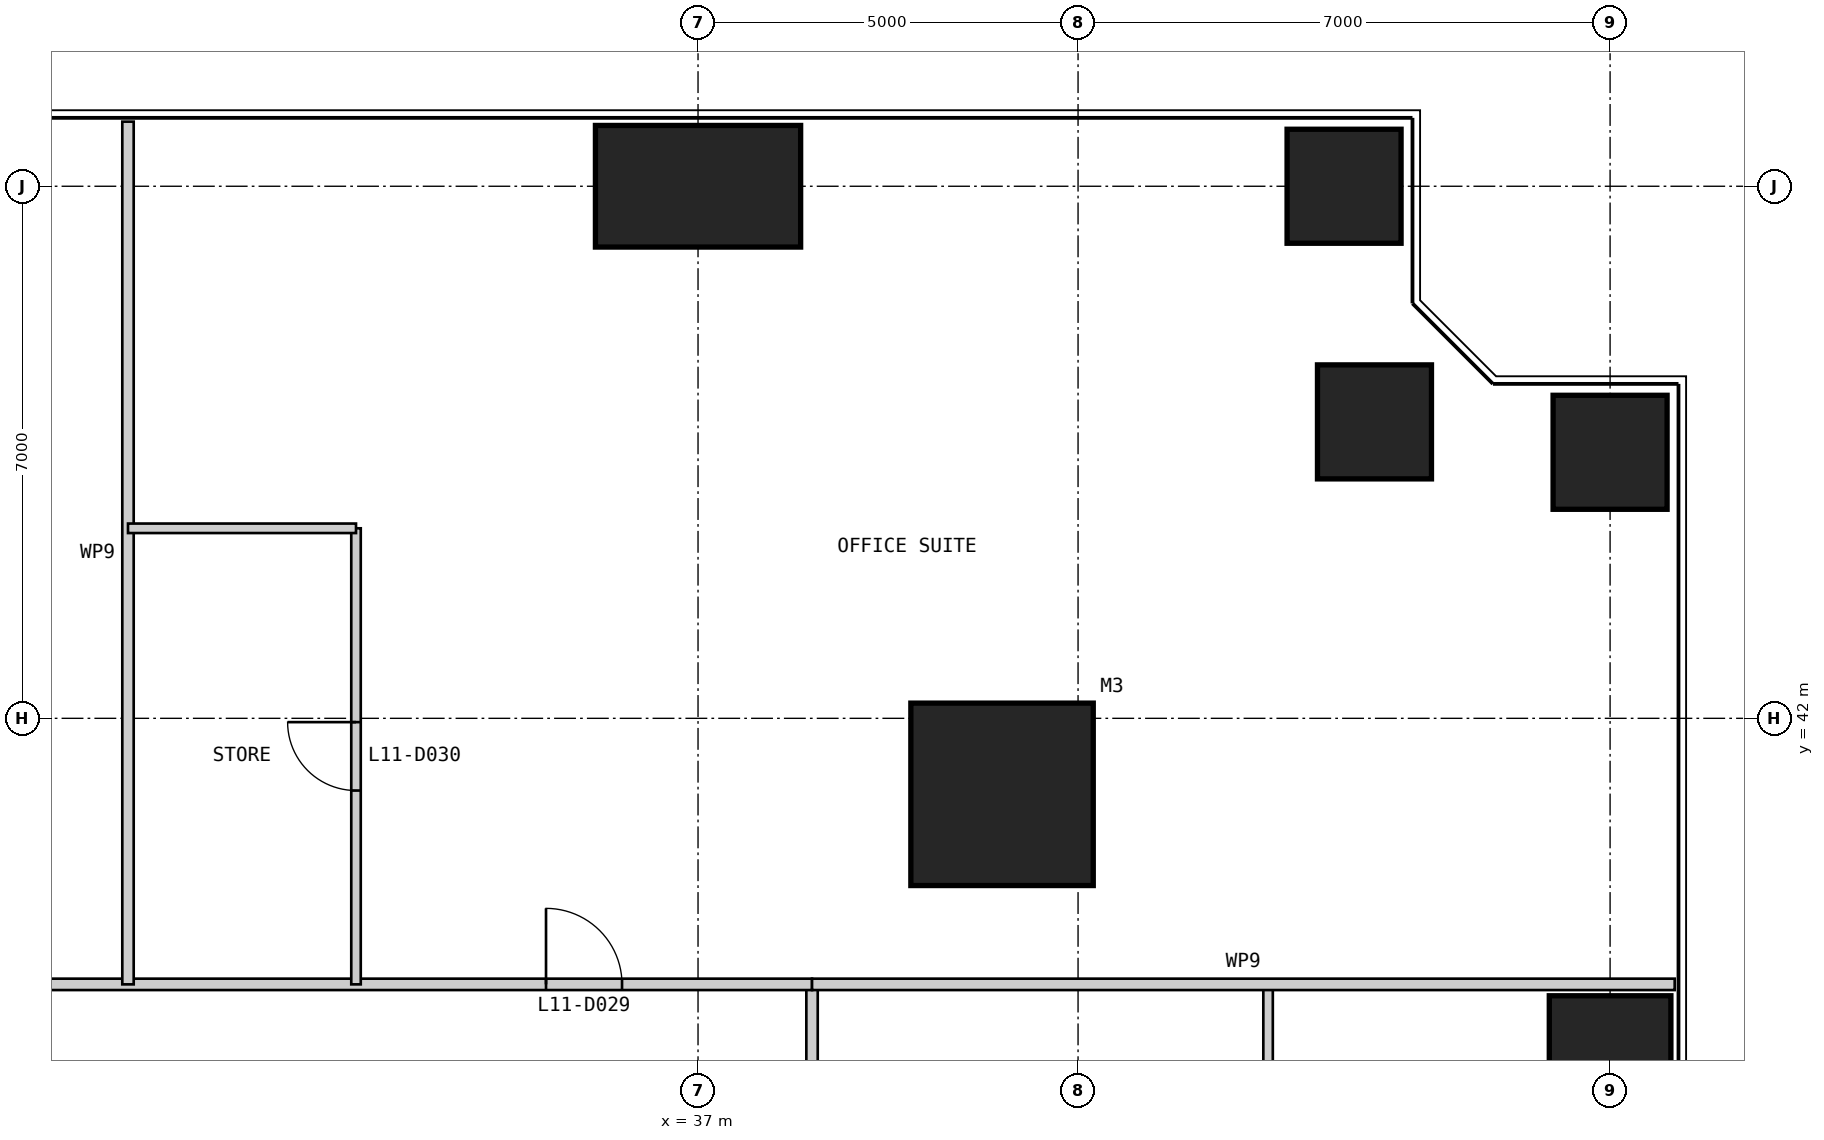
"""IFC4 building model, lengths in metres.
Left out: names, types, materials, properties, quantities, classifications, styles, units other than length and angle.
Written with IfcOpenShell. Run it as: python <this file> out.ifc"""

import sys

from ifc_helpers import new_model, si_unit, direction, frame, frame_2d, origin, origin_2d, place, context, subcontext, project, spatial, rectangle, extrude, element, fill, save


model = new_model("IFC4")
c1 = context("Model", 3, precision=1e-05, world=origin(), true_north=direction((0.0, 1.0)))
c2 = subcontext(c1, "Body", "Model", "MODEL_VIEW")
j1 = project(units=[si_unit("LENGTHUNIT", "METRE"), si_unit("PLANEANGLEUNIT", "RADIAN")], contexts=[c1])
p1 = place(None, origin())
s1 = spatial("IfcSite", under=j1, at=p1, CompositionType="ELEMENT")
p2 = place(p1, origin())
s2 = spatial("IfcBuilding", under=s1, at=p2, CompositionType="ELEMENT")
p3 = place(p2, frame((0.0, 0.0, 51.0)))
s3 = spatial("IfcBuildingStorey", under=s2, at=p3, CompositionType="ELEMENT", Elevation=51.0)
p4 = place(p3, frame((41.0, 41.0, 0.0), z_axis=(0.0, 0.0, 1.0), x_axis=(1.0, 0.0, 0.0)))
e1 = element("IfcColumn", 1, at=p4, inside=s3, PredefinedType="COLUMN", context=c2, shape_type="SweptSolid", body=[
    extrude(rectangle(XDim=2.4, YDim=2.4, at=origin_2d()), origin(), (0.0, 0.0, 1.0), 4.0),
])
p5 = place(p3, frame((49.0, 37.0, 0.0), z_axis=(0.0, 0.0, 1.0), x_axis=(1.0, 0.0, 0.0)))
e2 = element("IfcColumn", 2, at=p5, inside=s3, PredefinedType="COLUMN", context=c2, shape_type="SweptSolid", body=[
    extrude(rectangle(XDim=1.6, YDim=2.7, at=origin_2d()), origin(), (0.0, 0.0, 1.0), 4.0),
])
for number, where, z_axis, x_axis in (
    (3, (49.0, 45.5, 0.0), (0.0, 0.0, 1.0), (1.0, 0.0, 0.0)),
    (4, (45.9, 45.9, 0.0), (0.0, 0.0, 1.0), (1.0, 0.0, 0.0)),
    (5, (45.5, 49.0, 0.0), (0.0, 0.0, 1.0), (1.0, 0.0, 0.0)),
):
    element("IfcColumn", number, at=place(p3, frame(where, z_axis=z_axis, x_axis=x_axis)), inside=s3, PredefinedType="COLUMN", context=c2, shape_type="SweptSolid", body=[
        extrude(rectangle(XDim=1.5, YDim=1.5, at=origin_2d()), origin(), (0.0, 0.0, 1.0), 4.0),
    ])
p6 = place(p3, frame((37.0, 49.0, 0.0), z_axis=(0.0, 0.0, 1.0), x_axis=(1.0, 0.0, 0.0)))
e6 = element("IfcColumn", 6, at=p6, inside=s3, PredefinedType="COLUMN", context=c2, shape_type="SweptSolid", body=[
    extrude(rectangle(XDim=2.7, YDim=1.6, at=origin_2d()), origin(), (0.0, 0.0, 1.0), 4.0),
])
p7 = place(p3, frame((38.5, 11.5, 0.0), z_axis=(0.0, 0.0, 1.0), x_axis=(0.0, 1.0, 0.0)))
e7 = element("IfcWall", 7, at=p7, inside=s3, PredefinedType="PARTITIONING", context=c2, shape_type="SweptSolid", body=[
    extrude(rectangle(XDim=27.0, YDim=0.15, at=frame_2d((13.5, 0.0))), origin(), (0.0, 0.0, 1.0), 3.85),
])
p8 = place(p7, frame((2.5, 0.0, 0.0)))
e8 = element("IfcOpeningElement", 8, at=p8, cuts=e7, PredefinedType="OPENING", context=c2, shape_type="SweptSolid", body=[
    extrude(rectangle(XDim=1.0, YDim=2.2, at=frame_2d((0.5, 1.1))), frame((0.0, 0.085, 0.0), z_axis=(0.0, -1.0, 0.0), x_axis=(1.0, 0.0, 0.0)), (0.0, 0.0, 1.0), 0.17),
])
p9 = place(p7, frame((16.0, 0.0, 0.0)))
e9 = element("IfcOpeningElement", 9, at=p9, cuts=e7, PredefinedType="OPENING", context=c2, shape_type="SweptSolid", body=[
    extrude(rectangle(XDim=1.0, YDim=2.2, at=frame_2d((0.5, 1.1))), frame((0.0, 0.085, 0.0), z_axis=(0.0, -1.0, 0.0), x_axis=(1.0, 0.0, 0.0)), (0.0, 0.0, 1.0), 0.17),
])
p10 = place(p3, frame((44.5, 32.5, 0.0), z_axis=(0.0, 0.0, 1.0), x_axis=(0.0, 1.0, 0.0)))
e10 = element("IfcWall", 10, at=p10, inside=s3, PredefinedType="PARTITIONING", context=c2, shape_type="SweptSolid", body=[
    extrude(rectangle(XDim=6.0, YDim=0.125, at=frame_2d((3.0, 0.0))), origin(), (0.0, 0.0, 1.0), 3.85),
])
p11 = place(p3, frame((38.5, 38.5, 0.0), z_axis=(0.0, 0.0, 1.0), x_axis=(-1.0, 0.0, 0.0)))
e11 = element("IfcWall", 11, at=p11, inside=s3, PredefinedType="PARTITIONING", context=c2, shape_type="SweptSolid", body=[
    extrude(rectangle(XDim=27.0, YDim=0.15, at=frame_2d((13.5, 0.0))), origin(), (0.0, 0.0, 1.0), 3.85),
])
p12 = place(p11, frame((2.5, 0.0, 0.0)))
e12 = element("IfcOpeningElement", 12, at=p12, cuts=e11, PredefinedType="OPENING", context=c2, shape_type="SweptSolid", body=[
    extrude(rectangle(XDim=1.0, YDim=2.2, at=frame_2d((0.5, 1.1))), frame((0.0, 0.085, 0.0), z_axis=(0.0, -1.0, 0.0), x_axis=(1.0, 0.0, 0.0)), (0.0, 0.0, 1.0), 0.17),
])
p13 = place(p11, frame((16.0, 0.0, 0.0)))
e13 = element("IfcOpeningElement", 13, at=p13, cuts=e11, PredefinedType="OPENING", context=c2, shape_type="SweptSolid", body=[
    extrude(rectangle(XDim=1.0, YDim=2.2, at=frame_2d((0.5, 1.1))), frame((0.0, 0.085, 0.0), z_axis=(0.0, -1.0, 0.0), x_axis=(1.0, 0.0, 0.0)), (0.0, 0.0, 1.0), 0.17),
])
p14 = place(p3, frame((49.85, 38.5, 0.0), z_axis=(0.0, 0.0, 1.0), x_axis=(-1.0, 0.0, 0.0)))
e14 = element("IfcWall", 14, at=p14, inside=s3, PredefinedType="PARTITIONING", context=c2, shape_type="SweptSolid", body=[
    extrude(rectangle(XDim=11.35, YDim=0.15, at=frame_2d((5.675, 0.0))), origin(), (0.0, 0.0, 1.0), 3.85),
])
p15 = place(p3, frame((32.5, 44.5, 0.0), z_axis=(0.0, 0.0, 1.0), x_axis=(0.0, -1.0, 0.0)))
e15 = element("IfcWall", 15, at=p15, inside=s3, PredefinedType="PARTITIONING", context=c2, shape_type="SweptSolid", body=[
    extrude(rectangle(XDim=6.0, YDim=0.125, at=frame_2d((3.0, 0.0))), origin(), (0.0, 0.0, 1.0), 3.85),
])
p16 = place(p15, frame((2.55, 0.0, 0.0)))
e16 = element("IfcOpeningElement", 16, at=p16, cuts=e15, PredefinedType="OPENING", context=c2, shape_type="SweptSolid", body=[
    extrude(rectangle(XDim=0.9, YDim=2.2, at=frame_2d((0.45, 1.1))), frame((0.0, 0.073, 0.0), z_axis=(0.0, -1.0, 0.0), x_axis=(1.0, 0.0, 0.0)), (0.0, 0.0, 1.0), 0.145),
])
p17 = place(p3, frame((29.5, 49.85, 0.0), z_axis=(0.0, 0.0, 1.0), x_axis=(0.0, -1.0, 0.0)))
e17 = element("IfcWall", 17, at=p17, inside=s3, PredefinedType="PARTITIONING", context=c2, shape_type="SweptSolid", body=[
    extrude(rectangle(XDim=11.35, YDim=0.15, at=frame_2d((5.675, 0.0))), origin(), (0.0, 0.0, 1.0), 3.85),
])
p18 = place(p3, frame((32.5, 44.5, 0.0), z_axis=(0.0, 0.0, 1.0), x_axis=(-1.0, 0.0, 0.0)))
e18 = element("IfcWall", 18, at=p18, inside=s3, PredefinedType="PARTITIONING", context=c2, shape_type="SweptSolid", body=[
    extrude(rectangle(XDim=3.0, YDim=0.125, at=frame_2d((1.5, 0.0))), origin(), (0.0, 0.0, 1.0), 3.85),
])
p19 = place(p12, frame((1.0, 0.0, 0.0), z_axis=(0.0, 0.0, 1.0), x_axis=(-1.0, 0.0, 0.0)))
e19 = element("IfcDoor", 19, at=p19, inside=s3, OperationType="SINGLE_SWING_LEFT", PredefinedType="DOOR", context=c2, shape_type="SweptSolid", body=[
    extrude(rectangle(XDim=1.0, YDim=2.2, at=frame_2d((0.5, 1.1))), frame((0.0, 0.025, 0.0), z_axis=(0.0, -1.0, 0.0), x_axis=(1.0, 0.0, 0.0)), (0.0, 0.0, 1.0), 0.05),
])
fill(e12, e19)
p20 = place(p16, frame((0.9, 0.0, 0.0), z_axis=(0.0, 0.0, 1.0), x_axis=(-1.0, 0.0, 0.0)))
e20 = element("IfcDoor", 20, at=p20, inside=s3, OperationType="SINGLE_SWING_RIGHT", PredefinedType="DOOR", context=c2, shape_type="SweptSolid", body=[
    extrude(rectangle(XDim=0.9, YDim=2.2, at=frame_2d((0.45, 1.1))), frame((0.0, 0.025, 0.0), z_axis=(0.0, -1.0, 0.0), x_axis=(1.0, 0.0, 0.0)), (0.0, 0.0, 1.0), 0.05),
])
fill(e16, e20)
save(model, sys.argv[1])
